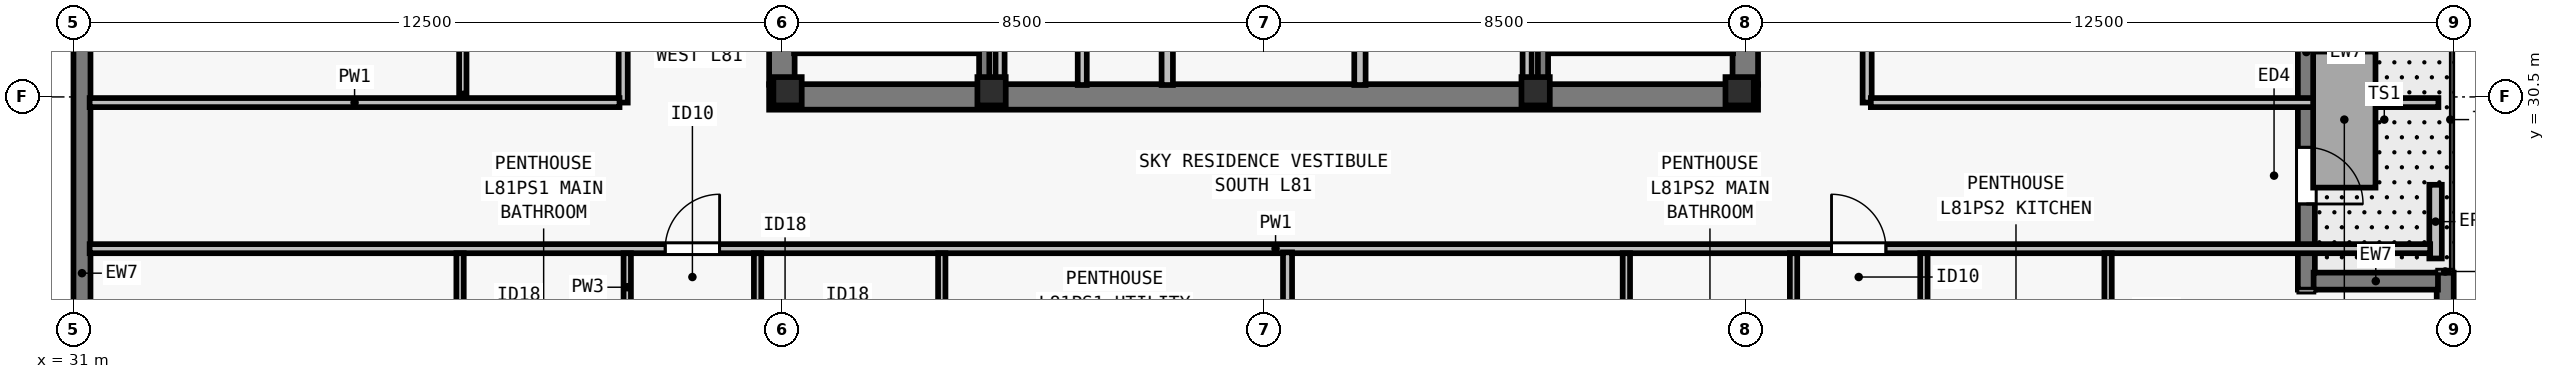
"""IFC4 building model, lengths in metres.
Left out: names, types, materials, properties, quantities, classifications, styles, units other than length and angle.
Written with IfcOpenShell. Run it as: python <this file> out.ifc"""

import sys

from ifc_helpers import new_model, si_unit, direction, frame, frame_2d, origin, origin_2d, place, context, subcontext, project, spatial, rectangle, i_section, extrude, element, fill, save


model = new_model("IFC4")
c1 = context("Model", 3, precision=1e-05, world=origin(), true_north=direction((0.0, 1.0)))
c2 = subcontext(c1, "Body", "Model", "MODEL_VIEW")
j1 = project(units=[si_unit("LENGTHUNIT", "METRE"), si_unit("PLANEANGLEUNIT", "RADIAN")], contexts=[c1])
p1 = place(None, origin())
s1 = spatial("IfcSite", under=j1, at=p1, CompositionType="ELEMENT")
p2 = place(p1, origin())
s2 = spatial("IfcBuilding", under=s1, at=p2, CompositionType="ELEMENT")
p3 = place(p2, frame((0.0, 0.0, 294.5)))
s3 = spatial("IfcBuildingStorey", under=s2, at=p3, CompositionType="ELEMENT", Elevation=294.5)
for number, where, z_axis, x_axis in (
    (1, (43.6, 30.6, 0.0), (0.0, 0.0, 1.0), (1.0, 0.0, 0.0)),
    (2, (47.2, 30.6, 0.0), (0.0, 0.0, 1.0), (1.0, 0.0, 0.0)),
    (3, (56.8, 30.6, 0.0), (0.0, 0.0, 1.0), (1.0, 0.0, 0.0)),
    (4, (60.4, 30.6, 0.0), (0.0, 0.0, 1.0), (1.0, 0.0, 0.0)),
):
    element("IfcColumn", number, at=place(p3, frame(where, z_axis=z_axis, x_axis=x_axis)), inside=s3, PredefinedType="COLUMN", context=c2, shape_type="SweptSolid", body=[
        extrude(i_section(OverallWidth=0.5, OverallDepth=0.5, WebThickness=0.028, FlangeThickness=0.045, at=origin_2d()), origin(), (0.0, 0.0, 1.0), 3.5),
    ])
p4 = place(p3, frame((72.85, 27.4, 0.0), z_axis=(0.0, 0.0, 1.0), x_axis=(0.0, -1.0, 0.0)))
e5 = element("IfcWall", 5, at=p4, inside=s3, PredefinedType="SOLIDWALL", context=c2, shape_type="SweptSolid", body=[
    extrude(rectangle(XDim=3.622, YDim=0.3, at=frame_2d((1.811, 0.0))), origin(), (0.0, 0.0, 1.0), 3.29),
])
p5 = place(p3, frame((31.15, 23.5, 0.0), z_axis=(0.0, 0.0, 1.0), x_axis=(0.0, 1.0, 0.0)))
e6 = element("IfcWall", 6, at=p5, inside=s3, PredefinedType="SOLIDWALL", context=c2, shape_type="SweptSolid", body=[
    extrude(rectangle(XDim=30.722, YDim=0.3, at=frame_2d((15.361, 0.0))), origin(), (0.0, 0.0, 1.0), 3.29),
])
p6 = place(p5, frame((7.93, 0.0, 0.8)))
e7 = element("IfcOpeningElement", 7, at=p6, cuts=e6, PredefinedType="OPENING", context=c2, shape_type="SweptSolid", body=[
    extrude(rectangle(XDim=1.65, YDim=1.758, at=frame_2d((0.825, 0.879))), frame((0.0, 0.16, 0.0), z_axis=(0.0, -1.0, 0.0), x_axis=(1.0, 0.0, 0.0)), (0.0, 0.0, 1.0), 0.32),
])
p7 = place(p5, frame((12.442, 0.0, 0.8)))
e8 = element("IfcOpeningElement", 8, at=p7, cuts=e6, PredefinedType="OPENING", context=c2, shape_type="SweptSolid", body=[
    extrude(rectangle(XDim=2.0, YDim=1.758, at=frame_2d((1.0, 0.879))), frame((0.0, 0.16, 0.0), z_axis=(0.0, -1.0, 0.0), x_axis=(1.0, 0.0, 0.0)), (0.0, 0.0, 1.0), 0.32),
])
p8 = place(p5, frame((16.455, 0.0, 0.8)))
e9 = element("IfcOpeningElement", 9, at=p8, cuts=e6, PredefinedType="OPENING", context=c2, shape_type="SweptSolid", body=[
    extrude(rectangle(XDim=1.65, YDim=1.758, at=frame_2d((0.825, 0.879))), frame((0.0, 0.16, 0.0), z_axis=(0.0, -1.0, 0.0), x_axis=(1.0, 0.0, 0.0)), (0.0, 0.0, 1.0), 0.32),
])
p9 = place(p5, frame((20.967, 0.0, 0.8)))
e10 = element("IfcOpeningElement", 10, at=p9, cuts=e6, PredefinedType="OPENING", context=c2, shape_type="SweptSolid", body=[
    extrude(rectangle(XDim=2.0, YDim=1.758, at=frame_2d((1.0, 0.879))), frame((0.0, 0.16, 0.0), z_axis=(0.0, -1.0, 0.0), x_axis=(1.0, 0.0, 0.0)), (0.0, 0.0, 1.0), 0.32),
])
p10 = place(p5, frame((24.579, 0.0, 0.8)))
e11 = element("IfcOpeningElement", 11, at=p10, cuts=e6, PredefinedType="OPENING", context=c2, shape_type="SweptSolid", body=[
    extrude(rectangle(XDim=1.65, YDim=1.758, at=frame_2d((0.825, 0.879))), frame((0.0, 0.16, 0.0), z_axis=(0.0, -1.0, 0.0), x_axis=(1.0, 0.0, 0.0)), (0.0, 0.0, 1.0), 0.32),
])
p11 = place(p5, frame((27.11, 0.0, 0.8)))
e12 = element("IfcOpeningElement", 12, at=p11, cuts=e6, PredefinedType="OPENING", context=c2, shape_type="SweptSolid", body=[
    extrude(rectangle(XDim=0.9, YDim=1.75, at=frame_2d((0.45, 0.875))), frame((0.0, 0.16, 0.0), z_axis=(0.0, -1.0, 0.0), x_axis=(1.0, 0.0, 0.0)), (0.0, 0.0, 1.0), 0.32),
])
p12 = place(p3, frame((70.4, 32.822, 0.0), z_axis=(0.0, 0.0, 1.0), x_axis=(0.0, -1.0, 0.0)))
e13 = element("IfcWall", 13, at=p12, inside=s3, PredefinedType="SOLIDWALL", context=c2, shape_type="SweptSolid", body=[
    extrude(rectangle(XDim=5.722, YDim=0.3, at=frame_2d((2.861, 0.0))), origin(), (0.0, 0.0, 1.0), 3.29),
])
p13 = place(p12, frame((3.211, 0.0, 0.0)))
e14 = element("IfcOpeningElement", 14, at=p13, cuts=e13, PredefinedType="OPENING", context=c2, shape_type="SweptSolid", body=[
    extrude(rectangle(XDim=1.0, YDim=2.15, at=frame_2d((0.5, 1.075))), frame((0.0, 0.16, 0.0), z_axis=(0.0, -1.0, 0.0), x_axis=(1.0, 0.0, 0.0)), (0.0, 0.0, 1.0), 0.32),
])
p14 = place(p3, frame((70.528, 27.25, 0.0), z_axis=(0.0, 0.0, 1.0), x_axis=(1.0, 0.0, 0.0)))
e15 = element("IfcWall", 15, at=p14, inside=s3, PredefinedType="SOLIDWALL", context=c2, shape_type="SweptSolid", body=[
    extrude(rectangle(XDim=2.194, YDim=0.3, at=frame_2d((1.097, 0.0))), origin(), (0.0, 0.0, 1.0), 3.29),
])
p15 = place(p3, frame((72.68, 27.65, 0.0), z_axis=(0.0, 0.0, 1.0), x_axis=(0.0, 1.0, 0.0)))
e16 = element("IfcWall", 16, at=p15, inside=s3, PredefinedType="PARAPET", context=c2, shape_type="SweptSolid", body=[
    extrude(rectangle(XDim=1.3, YDim=0.22, at=frame_2d((0.65, 0.0))), origin(), (0.0, 0.0, 1.0), 0.55),
])
p16 = place(p3, frame((43.275, 30.5, 0.0), z_axis=(0.0, 0.0, 1.0), x_axis=(1.0, 0.0, 0.0)))
e17 = element("IfcWall", 17, at=p16, inside=s3, PredefinedType="SHEAR", context=c2, shape_type="SweptSolid", body=[
    extrude(rectangle(XDim=17.45, YDim=0.45, at=frame_2d((8.725, 0.0))), origin(), (0.0, 0.0, 1.0), 3.29),
])
for number, where, z_axis, x_axis in (
    (18, (43.5, 30.715, 0.0), (0.0, 0.0, 1.0), (0.0, 1.0, 0.0)),
    (19, (60.5, 30.715, 0.0), (0.0, 0.0, 1.0), (0.0, 1.0, 0.0)),
):
    element("IfcWall", number, at=place(p3, frame(where, z_axis=z_axis, x_axis=x_axis)), inside=s3, PredefinedType="SHEAR", context=c2, shape_type="SweptSolid", body=[
        extrude(rectangle(XDim=8.035, YDim=0.45, at=frame_2d((4.018, 0.0))), origin(), (0.0, 0.0, 1.0), 3.29),
    ])
p17 = place(p3, frame((50.3, 30.71, 0.0), z_axis=(0.0, 0.0, 1.0), x_axis=(0.0, 1.0, 0.0)))
e20 = element("IfcWall", 20, at=p17, inside=s3, PredefinedType="SOLIDWALL", context=c2, shape_type="SweptSolid", body=[
    extrude(rectangle(XDim=7.905, YDim=0.2, at=frame_2d((3.953, 0.0))), origin(), (0.0, 0.0, 1.0), 3.29),
])
p18 = place(p17, frame((2.14, 0.0, 0.0)))
e21 = element("IfcOpeningElement", 21, at=p18, cuts=e20, PredefinedType="OPENING", context=c2, shape_type="SweptSolid", body=[
    extrude(rectangle(XDim=0.95, YDim=2.12, at=frame_2d((0.475, 1.06))), frame((0.0, 0.11, 0.0), z_axis=(0.0, -1.0, 0.0), x_axis=(1.0, 0.0, 0.0)), (0.0, 0.0, 1.0), 0.22),
])
p19 = place(p3, frame((53.7, 30.71, 0.0), z_axis=(0.0, 0.0, 1.0), x_axis=(0.0, 1.0, 0.0)))
e22 = element("IfcWall", 22, at=p19, inside=s3, PredefinedType="SOLIDWALL", context=c2, shape_type="SweptSolid", body=[
    extrude(rectangle(XDim=7.905, YDim=0.2, at=frame_2d((3.953, 0.0))), origin(), (0.0, 0.0, 1.0), 3.29),
])
p20 = place(p19, frame((1.39, 0.0, 0.0)))
e23 = element("IfcOpeningElement", 23, at=p20, cuts=e22, PredefinedType="OPENING", context=c2, shape_type="SweptSolid", body=[
    extrude(rectangle(XDim=0.95, YDim=2.12, at=frame_2d((0.475, 1.06))), frame((0.0, 0.11, 0.0), z_axis=(0.0, -1.0, 0.0), x_axis=(1.0, 0.0, 0.0)), (0.0, 0.0, 1.0), 0.22),
])
p21 = place(p19, frame((5.39, 0.0, 0.0)))
e24 = element("IfcOpeningElement", 24, at=p21, cuts=e22, PredefinedType="OPENING", context=c2, shape_type="SweptSolid", body=[
    extrude(rectangle(XDim=0.85, YDim=2.12, at=frame_2d((0.425, 1.06))), frame((0.0, 0.11, 0.0), z_axis=(0.0, -1.0, 0.0), x_axis=(1.0, 0.0, 0.0)), (0.0, 0.0, 1.0), 0.22),
])
p22 = place(p3, frame((47.35, 30.71, 0.0), z_axis=(0.0, 0.0, 1.0), x_axis=(0.0, 1.0, 0.0)))
e25 = element("IfcWall", 25, at=p22, inside=s3, PredefinedType="PARTITIONING", context=c2, shape_type="SweptSolid", body=[
    extrude(rectangle(XDim=7.905, YDim=0.16, at=frame_2d((3.953, 0.0))), origin(), (0.0, 0.0, 1.0), 3.29),
])
p23 = place(p3, frame((48.8, 30.71, 0.0), z_axis=(0.0, 0.0, 1.0), x_axis=(0.0, 1.0, 0.0)))
e26 = element("IfcWall", 26, at=p23, inside=s3, PredefinedType="PARTITIONING", context=c2, shape_type="SweptSolid", body=[
    extrude(rectangle(XDim=7.905, YDim=0.16, at=frame_2d((3.953, 0.0))), origin(), (0.0, 0.0, 1.0), 3.29),
])
p24 = place(p23, frame((3.54, 0.0, 0.0)))
e27 = element("IfcOpeningElement", 27, at=p24, cuts=e26, PredefinedType="OPENING", context=c2, shape_type="SweptSolid", body=[
    extrude(rectangle(XDim=0.85, YDim=2.12, at=frame_2d((0.425, 1.06))), frame((0.0, 0.09, 0.0), z_axis=(0.0, -1.0, 0.0), x_axis=(1.0, 0.0, 0.0)), (0.0, 0.0, 1.0), 0.18),
])
p25 = place(p3, frame((56.65, 30.71, 0.0), z_axis=(0.0, 0.0, 1.0), x_axis=(0.0, 1.0, 0.0)))
e28 = element("IfcWall", 28, at=p25, inside=s3, PredefinedType="PARTITIONING", context=c2, shape_type="SweptSolid", body=[
    extrude(rectangle(XDim=7.905, YDim=0.16, at=frame_2d((3.953, 0.0))), origin(), (0.0, 0.0, 1.0), 3.29),
])
p26 = place(p3, frame((31.285, 27.823, 0.0), z_axis=(0.0, 0.0, 1.0), x_axis=(1.0, 0.0, 0.0)))
e29 = element("IfcWall", 29, at=p26, inside=s3, PredefinedType="PARTITIONING", context=c2, shape_type="SweptSolid", body=[
    extrude(rectangle(XDim=41.3, YDim=0.16, at=frame_2d((20.65, 0.0))), origin(), (0.0, 0.0, 1.0), 3.009),
])
p27 = place(p26, frame((10.156, 0.0, 0.0)))
e30 = element("IfcOpeningElement", 30, at=p27, cuts=e29, PredefinedType="OPENING", context=c2, shape_type="SweptSolid", body=[
    extrude(rectangle(XDim=0.96, YDim=2.18, at=frame_2d((0.48, 1.09))), frame((0.0, 0.09, 0.0), z_axis=(0.0, -1.0, 0.0), x_axis=(1.0, 0.0, 0.0)), (0.0, 0.0, 1.0), 0.18),
])
p28 = place(p26, frame((30.736, 0.0, 0.0)))
e31 = element("IfcOpeningElement", 31, at=p28, cuts=e29, PredefinedType="OPENING", context=c2, shape_type="SweptSolid", body=[
    extrude(rectangle(XDim=0.96, YDim=2.18, at=frame_2d((0.48, 1.09))), frame((0.0, 0.09, 0.0), z_axis=(0.0, -1.0, 0.0), x_axis=(1.0, 0.0, 0.0)), (0.0, 0.0, 1.0), 0.18),
])
p29 = place(p3, frame((40.7, 30.4, 0.0), z_axis=(0.0, 0.0, 1.0), x_axis=(0.0, 1.0, 0.0)))
e32 = element("IfcWall", 32, at=p29, inside=s3, PredefinedType="PARTITIONING", context=c2, shape_type="SweptSolid", body=[
    extrude(rectangle(XDim=17.2, YDim=0.16, at=frame_2d((8.6, 0.0))), origin(), (0.0, 0.0, 1.0), 3.009),
])
p30 = place(p29, frame((3.82, 0.0, 0.0)))
e33 = element("IfcOpeningElement", 33, at=p30, cuts=e32, PredefinedType="OPENING", context=c2, shape_type="SweptSolid", body=[
    extrude(rectangle(XDim=0.96, YDim=2.18, at=frame_2d((0.48, 1.09))), frame((0.0, 0.09, 0.0), z_axis=(0.0, -1.0, 0.0), x_axis=(1.0, 0.0, 0.0)), (0.0, 0.0, 1.0), 0.18),
])
p31 = place(p29, frame((12.42, 0.0, 0.0)))
e34 = element("IfcOpeningElement", 34, at=p31, cuts=e32, PredefinedType="OPENING", context=c2, shape_type="SweptSolid", body=[
    extrude(rectangle(XDim=0.96, YDim=2.18, at=frame_2d((0.48, 1.09))), frame((0.0, 0.09, 0.0), z_axis=(0.0, -1.0, 0.0), x_axis=(1.0, 0.0, 0.0)), (0.0, 0.0, 1.0), 0.18),
])
p32 = place(p3, frame((62.65, 30.4, 0.0), z_axis=(0.0, 0.0, 1.0), x_axis=(0.0, 1.0, 0.0)))
e35 = element("IfcWall", 35, at=p32, inside=s3, PredefinedType="PARTITIONING", context=c2, shape_type="SweptSolid", body=[
    extrude(rectangle(XDim=17.2, YDim=0.16, at=frame_2d((8.6, 0.0))), origin(), (0.0, 0.0, 1.0), 3.29),
])
p33 = place(p32, frame((8.0, 0.0, 0.0)))
e36 = element("IfcOpeningElement", 36, at=p33, cuts=e35, PredefinedType="OPENING", context=c2, shape_type="SweptSolid", body=[
    extrude(rectangle(XDim=0.96, YDim=2.12, at=frame_2d((0.48, 1.06))), frame((0.0, 0.09, 0.0), z_axis=(0.0, -1.0, 0.0), x_axis=(1.0, 0.0, 0.0)), (0.0, 0.0, 1.0), 0.18),
])
p34 = place(p3, frame((31.285, 30.4, 0.0), z_axis=(0.0, 0.0, 1.0), x_axis=(1.0, 0.0, 0.0)))
e37 = element("IfcWall", 37, at=p34, inside=s3, PredefinedType="PARTITIONING", context=c2, shape_type="SweptSolid", body=[
    extrude(rectangle(XDim=9.35, YDim=0.16, at=frame_2d((4.675, 0.0))), origin(), (0.0, 0.0, 1.0), 3.29),
])
p35 = place(p3, frame((62.715, 30.4, 0.0), z_axis=(0.0, 0.0, 1.0), x_axis=(1.0, 0.0, 0.0)))
e38 = element("IfcWall", 38, at=p35, inside=s3, PredefinedType="PARTITIONING", context=c2, shape_type="SweptSolid", body=[
    extrude(rectangle(XDim=10.015, YDim=0.16, at=frame_2d((5.007, 0.0))), origin(), (0.0, 0.0, 1.0), 3.29),
])
p36 = place(p3, frame((37.821, 24.992, 0.0), z_axis=(0.0, 0.0, 1.0), x_axis=(0.0, 1.0, 0.0)))
e39 = element("IfcWall", 39, at=p36, inside=s3, PredefinedType="PLUMBINGWALL", context=c2, shape_type="SweptSolid", body=[
    extrude(rectangle(XDim=2.75, YDim=0.13, at=frame_2d((1.375, 0.0))), origin(), (0.0, 0.0, 1.0), 3.29),
])
p37 = place(p3, frame((40.771, 24.992, 0.0), z_axis=(0.0, 0.0, 1.0), x_axis=(0.0, 1.0, 0.0)))
e40 = element("IfcWall", 40, at=p37, inside=s3, PredefinedType="PLUMBINGWALL", context=c2, shape_type="SweptSolid", body=[
    extrude(rectangle(XDim=2.75, YDim=0.13, at=frame_2d((1.375, 0.0))), origin(), (0.0, 0.0, 1.0), 2.653),
])
p38 = place(p37, frame((0.55, 0.0, 0.0)))
e41 = element("IfcOpeningElement", 41, at=p38, cuts=e40, PredefinedType="OPENING", context=c2, shape_type="SweptSolid", body=[
    extrude(rectangle(XDim=0.85, YDim=2.08, at=frame_2d((0.425, 1.04))), frame((0.0, 0.075, 0.0), z_axis=(0.0, -1.0, 0.0), x_axis=(1.0, 0.0, 0.0)), (0.0, 0.0, 1.0), 0.15),
])
p39 = place(p3, frame((46.321, 24.992, 0.0), z_axis=(0.0, 0.0, 1.0), x_axis=(0.0, 1.0, 0.0)))
e42 = element("IfcWall", 42, at=p39, inside=s3, PredefinedType="PLUMBINGWALL", context=c2, shape_type="SweptSolid", body=[
    extrude(rectangle(XDim=2.75, YDim=0.13, at=frame_2d((1.375, 0.0))), origin(), (0.0, 0.0, 1.0), 3.29),
])
p40 = place(p3, frame((43.071, 24.992, 0.0), z_axis=(0.0, 0.0, 1.0), x_axis=(0.0, 1.0, 0.0)))
e43 = element("IfcWall", 43, at=p40, inside=s3, PredefinedType="PLUMBINGWALL", context=c2, shape_type="SweptSolid", body=[
    extrude(rectangle(XDim=2.75, YDim=0.13, at=frame_2d((1.375, 0.0))), origin(), (0.0, 0.0, 1.0), 3.29),
])
p41 = place(p40, frame((0.55, 0.0, 0.0)))
e44 = element("IfcOpeningElement", 44, at=p41, cuts=e43, PredefinedType="OPENING", context=c2, shape_type="SweptSolid", body=[
    extrude(rectangle(XDim=0.88, YDim=2.1, at=frame_2d((0.44, 1.05))), frame((0.0, 0.075, 0.0), z_axis=(0.0, -1.0, 0.0), x_axis=(1.0, 0.0, 0.0)), (0.0, 0.0, 1.0), 0.15),
])
p42 = place(p3, frame((52.423, 18.285, 0.0), z_axis=(0.0, 0.0, 1.0), x_axis=(0.0, 1.0, 0.0)))
e45 = element("IfcWall", 45, at=p42, inside=s3, PredefinedType="PARTITIONING", context=c2, shape_type="SweptSolid", body=[
    extrude(rectangle(XDim=9.473, YDim=0.16, at=frame_2d((4.736, 0.0))), origin(), (0.0, 0.0, 1.0), 3.009),
])
p43 = place(p3, frame((58.401, 24.992, 0.0), z_axis=(0.0, 0.0, 1.0), x_axis=(0.0, 1.0, 0.0)))
e46 = element("IfcWall", 46, at=p43, inside=s3, PredefinedType="PLUMBINGWALL", context=c2, shape_type="SweptSolid", body=[
    extrude(rectangle(XDim=2.75, YDim=0.13, at=frame_2d((1.375, 0.0))), origin(), (0.0, 0.0, 1.0), 3.29),
])
p44 = place(p3, frame((61.351, 24.992, 0.0), z_axis=(0.0, 0.0, 1.0), x_axis=(0.0, 1.0, 0.0)))
e47 = element("IfcWall", 47, at=p44, inside=s3, PredefinedType="PLUMBINGWALL", context=c2, shape_type="SweptSolid", body=[
    extrude(rectangle(XDim=2.75, YDim=0.13, at=frame_2d((1.375, 0.0))), origin(), (0.0, 0.0, 1.0), 3.29),
])
p45 = place(p44, frame((0.55, 0.0, 0.0)))
e48 = element("IfcOpeningElement", 48, at=p45, cuts=e47, PredefinedType="OPENING", context=c2, shape_type="SweptSolid", body=[
    extrude(rectangle(XDim=0.85, YDim=2.08, at=frame_2d((0.425, 1.04))), frame((0.0, 0.075, 0.0), z_axis=(0.0, -1.0, 0.0), x_axis=(1.0, 0.0, 0.0)), (0.0, 0.0, 1.0), 0.15),
])
p46 = place(p3, frame((66.901, 24.992, 0.0), z_axis=(0.0, 0.0, 1.0), x_axis=(0.0, 1.0, 0.0)))
e49 = element("IfcWall", 49, at=p46, inside=s3, PredefinedType="PLUMBINGWALL", context=c2, shape_type="SweptSolid", body=[
    extrude(rectangle(XDim=2.75, YDim=0.13, at=frame_2d((1.375, 0.0))), origin(), (0.0, 0.0, 1.0), 3.29),
])
p47 = place(p3, frame((63.651, 24.992, 0.0), z_axis=(0.0, 0.0, 1.0), x_axis=(0.0, 1.0, 0.0)))
e50 = element("IfcWall", 50, at=p47, inside=s3, PredefinedType="PLUMBINGWALL", context=c2, shape_type="SweptSolid", body=[
    extrude(rectangle(XDim=2.75, YDim=0.13, at=frame_2d((1.375, 0.0))), origin(), (0.0, 0.0, 1.0), 2.653),
])
p48 = place(p47, frame((0.55, 0.0, 0.0)))
e51 = element("IfcOpeningElement", 51, at=p48, cuts=e50, PredefinedType="OPENING", context=c2, shape_type="SweptSolid", body=[
    extrude(rectangle(XDim=0.88, YDim=2.1, at=frame_2d((0.44, 1.05))), frame((0.0, 0.075, 0.0), z_axis=(0.0, -1.0, 0.0), x_axis=(1.0, 0.0, 0.0)), (0.0, 0.0, 1.0), 0.15),
])
p49 = place(p3, frame((37.87, 30.56, 0.0), z_axis=(0.0, 0.0, 1.0), x_axis=(0.0, 1.0, 0.0)))
e52 = element("IfcWall", 52, at=p49, inside=s3, PredefinedType="PLUMBINGWALL", context=c2, shape_type="SweptSolid", body=[
    extrude(rectangle(XDim=2.94, YDim=0.13, at=frame_2d((1.47, 0.0))), origin(), (0.0, 0.0, 1.0), 3.29),
])
p50 = place(p3, frame((43.715, 31.36, 0.0), z_axis=(0.0, 0.0, 1.0), x_axis=(1.0, 0.0, 0.0)))
e53 = element("IfcWall", 53, at=p50, inside=s3, PredefinedType="SOLIDWALL", context=c2, shape_type="SweptSolid", body=[
    extrude(rectangle(XDim=3.28, YDim=0.18, at=frame_2d((1.64, 0.0))), origin(), (0.0, 0.0, 1.0), 3.29),
])
p51 = place(p3, frame((47.07, 38.78, 0.0), z_axis=(0.0, 0.0, 1.0), x_axis=(0.0, -1.0, 0.0)))
e54 = element("IfcWall", 54, at=p51, inside=s3, PredefinedType="SOLIDWALL", context=c2, shape_type="SweptSolid", body=[
    extrude(rectangle(XDim=8.067, YDim=0.18, at=frame_2d((4.034, 0.0))), origin(), (0.0, 0.0, 1.0), 3.29),
])
p52 = place(p3, frame((57.005, 31.36, 0.0), z_axis=(0.0, 0.0, 1.0), x_axis=(1.0, 0.0, 0.0)))
e55 = element("IfcWall", 55, at=p52, inside=s3, PredefinedType="SOLIDWALL", context=c2, shape_type="SweptSolid", body=[
    extrude(rectangle(XDim=3.28, YDim=0.18, at=frame_2d((1.64, 0.0))), origin(), (0.0, 0.0, 1.0), 3.29),
])
p53 = place(p3, frame((56.93, 38.78, 0.0), z_axis=(0.0, 0.0, 1.0), x_axis=(0.0, -1.0, 0.0)))
e56 = element("IfcWall", 56, at=p53, inside=s3, PredefinedType="SOLIDWALL", context=c2, shape_type="SweptSolid", body=[
    extrude(rectangle(XDim=8.067, YDim=0.18, at=frame_2d((4.034, 0.0))), origin(), (0.0, 0.0, 1.0), 3.29),
])
p54 = place(p13, origin())
e57 = element("IfcDoor", 57, at=p54, inside=s3, OperationType="SINGLE_SWING_RIGHT", PredefinedType="DOOR", context=c2, shape_type="SweptSolid", body=[
    extrude(rectangle(XDim=1.0, YDim=2.15, at=frame_2d((0.5, 1.075))), frame((0.0, 0.025, 0.0), z_axis=(0.0, -1.0, 0.0), x_axis=(1.0, 0.0, 0.0)), (0.0, 0.0, 1.0), 0.05),
])
fill(e14, e57)
p55 = place(p27, origin())
e58 = element("IfcDoor", 58, at=p55, inside=s3, OperationType="SINGLE_SWING_RIGHT", PredefinedType="DOOR", context=c2, shape_type="SweptSolid", body=[
    extrude(rectangle(XDim=0.96, YDim=2.18, at=frame_2d((0.48, 1.09))), frame((0.0, 0.025, 0.0), z_axis=(0.0, -1.0, 0.0), x_axis=(1.0, 0.0, 0.0)), (0.0, 0.0, 1.0), 0.05),
])
fill(e30, e58)
p56 = place(p28, origin())
e59 = element("IfcDoor", 59, at=p56, inside=s3, OperationType="SINGLE_SWING_LEFT", PredefinedType="DOOR", context=c2, shape_type="SweptSolid", body=[
    extrude(rectangle(XDim=0.96, YDim=2.18, at=frame_2d((0.48, 1.09))), frame((0.0, 0.025, 0.0), z_axis=(0.0, -1.0, 0.0), x_axis=(1.0, 0.0, 0.0)), (0.0, 0.0, 1.0), 0.05),
])
fill(e31, e59)
save(model, sys.argv[1])
